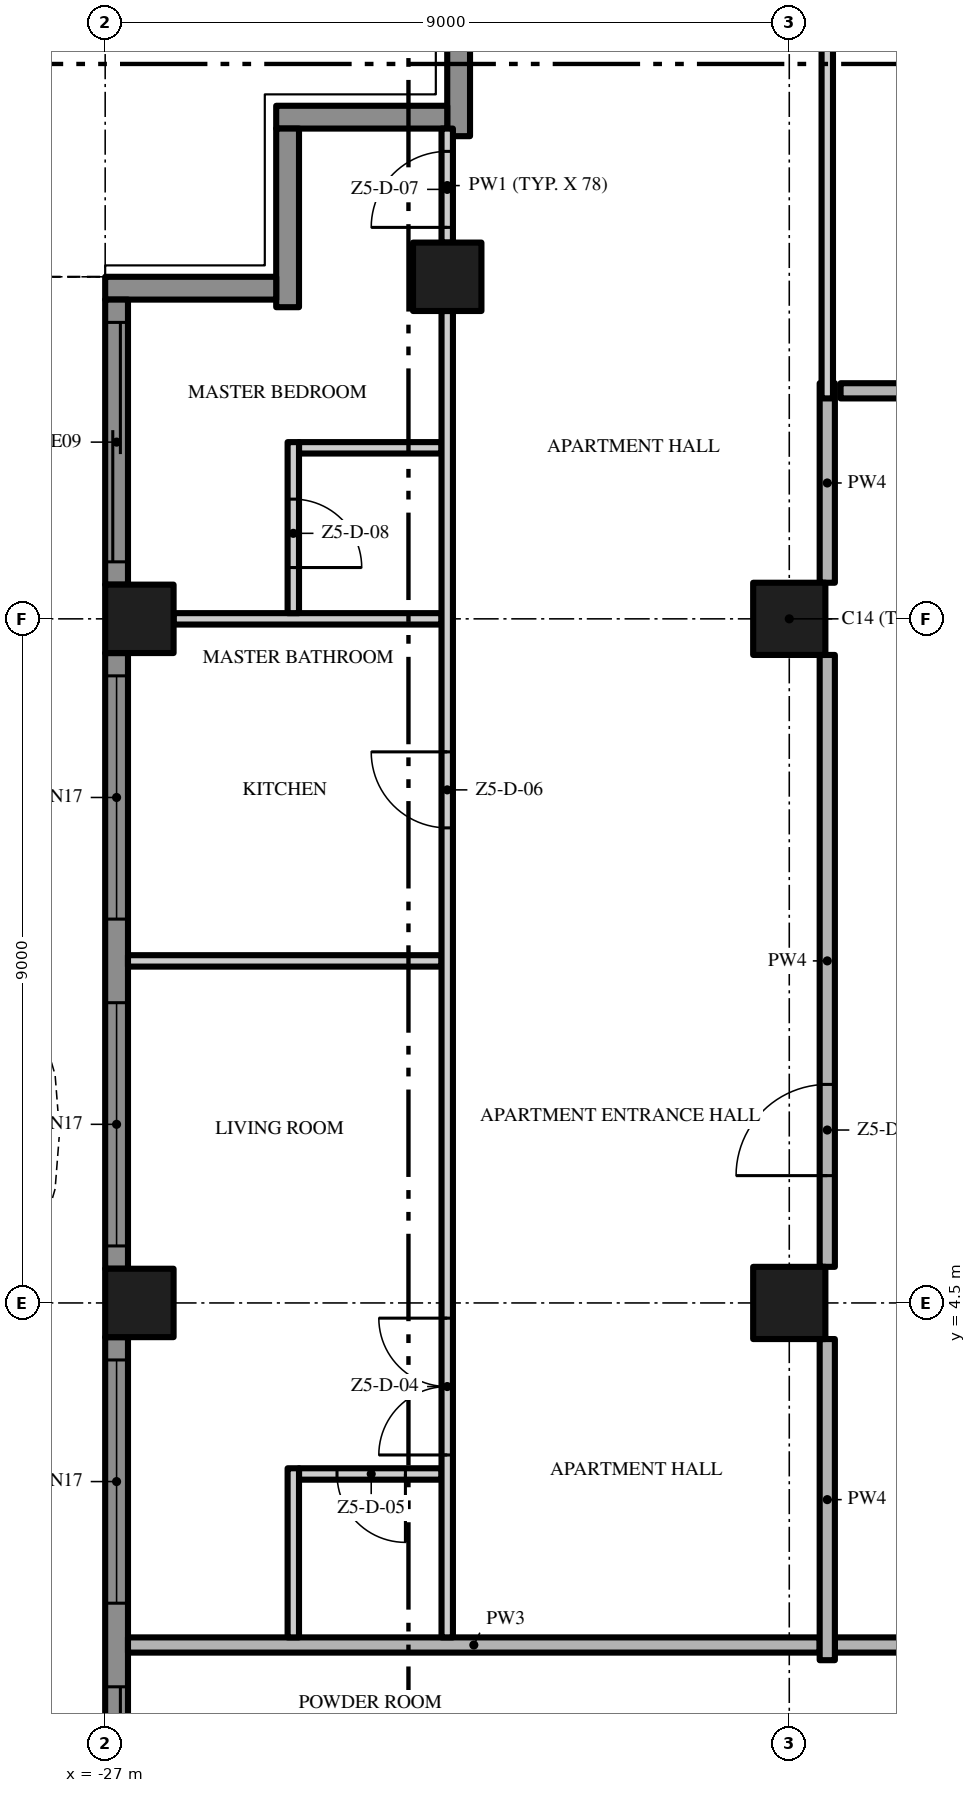
"""IFC4 building model, lengths in metres.
Left out: names, types, materials, properties, quantities, classifications, styles, units other than length and angle.
Written with IfcOpenShell. Run it as: python <this file> out.ifc"""

import sys

from ifc_helpers import new_model, si_unit, direction, frame, frame_2d, origin, origin_2d, place, context, subcontext, project, spatial, polyline, rectangle, outline, extrude, element, fill, save


model = new_model("IFC4")
c1 = context("Model", 3, precision=1e-05, world=origin(), true_north=direction((0.0, 1.0)))
c2 = subcontext(c1, "Body", "Model", "MODEL_VIEW")
j1 = project(units=[si_unit("LENGTHUNIT", "METRE"), si_unit("PLANEANGLEUNIT", "RADIAN")], contexts=[c1])
p1 = place(None, origin())
s1 = spatial("IfcSite", under=j1, at=p1, CompositionType="ELEMENT")
p2 = place(p1, origin())
s2 = spatial("IfcBuilding", under=s1, at=p2, CompositionType="ELEMENT")
p3 = place(p2, frame((0.0, 0.0, 273.0)))
s3 = spatial("IfcBuildingStorey", under=s2, at=p3, CompositionType="ELEMENT", Elevation=273.0)
for number, where, z_axis, x_axis in (
    (1, (-18.0, 13.5, 0.0), (0.0, 0.0, 1.0), (1.0, 0.0, 0.0)),
    (2, (-18.0, 4.5, 0.0), (0.0, 0.0, 1.0), (1.0, 0.0, 0.0)),
):
    element("IfcColumn", number, at=place(p3, frame(where, z_axis=z_axis, x_axis=x_axis)), inside=s3, PredefinedType="COLUMN", context=c2, shape_type="SweptSolid", body=[
        extrude(rectangle(XDim=0.95, YDim=0.95, at=origin_2d()), origin(), (0.0, 0.0, 1.0), 3.5),
    ])
for number, where, z_axis, x_axis in (
    (3, (-26.55, 13.5, 0.0), (0.0, 0.0, 1.0), (1.0, 0.0, 0.0)),
    (4, (-22.5, 18.0, 0.0), (0.0, 0.0, 1.0), (1.0, 0.0, 0.0)),
    (5, (-26.55, 4.5, 0.0), (0.0, 0.0, 1.0), (1.0, 0.0, 0.0)),
):
    element("IfcColumn", number, at=place(p3, frame(where, z_axis=z_axis, x_axis=x_axis)), inside=s3, PredefinedType="COLUMN", context=c2, shape_type="SweptSolid", body=[
        extrude(rectangle(XDim=0.9, YDim=0.9, at=origin_2d()), origin(), (0.0, 0.0, 1.0), 3.5),
    ])
p4 = place(p3, frame((-22.35, 19.85, 0.0), z_axis=(0.0, 0.0, 1.0), x_axis=(0.0, 1.0, 0.0)))
e6 = element("IfcWall", 6, at=p4, inside=s3, PredefinedType="SOLIDWALL", context=c2, shape_type="SweptSolid", body=[
    extrude(rectangle(XDim=2.35, YDim=0.3, at=frame_2d((1.175, 0.0))), origin(), (0.0, 0.0, 1.0), 3.5),
])
p5 = place(p3, frame((-24.75, 20.1, 0.0), z_axis=(0.0, 0.0, 1.0), x_axis=(1.0, 0.0, 0.0)))
e7 = element("IfcWall", 7, at=p5, inside=s3, PredefinedType="SOLIDWALL", context=c2, shape_type="SweptSolid", body=[
    extrude(rectangle(XDim=2.25, YDim=0.3, at=frame_2d((1.125, 0.0))), origin(), (0.0, 0.0, 1.0), 3.5),
])
p6 = place(p3, frame((-24.6, 17.6, 0.0), z_axis=(0.0, 0.0, 1.0), x_axis=(0.0, 1.0, 0.0)))
e8 = element("IfcWall", 8, at=p6, inside=s3, PredefinedType="SOLIDWALL", context=c2, shape_type="SweptSolid", body=[
    extrude(rectangle(XDim=2.35, YDim=0.3, at=frame_2d((1.175, 0.0))), origin(), (0.0, 0.0, 1.0), 3.5),
])
p7 = place(p3, frame((-27.0, 17.85, 0.0), z_axis=(0.0, 0.0, 1.0), x_axis=(1.0, 0.0, 0.0)))
e9 = element("IfcWall", 9, at=p7, inside=s3, PredefinedType="SOLIDWALL", context=c2, shape_type="SweptSolid", body=[
    extrude(rectangle(XDim=2.25, YDim=0.3, at=frame_2d((1.125, 0.0))), origin(), (0.0, 0.0, 1.0), 3.5),
])
p8 = place(p3, frame((-26.85, 13.95, 0.0), z_axis=(0.0, 0.0, 1.0), x_axis=(0.0, 1.0, 0.0)))
e10 = element("IfcWall", 10, at=p8, inside=s3, PredefinedType="SOLIDWALL", context=c2, shape_type="SweptSolid", body=[
    extrude(rectangle(XDim=3.75, YDim=0.3, at=frame_2d((1.875, 0.0))), origin(), (0.0, 0.0, 1.0), 3.5),
])
p9 = place(p8, frame((0.3, 0.0, 0.0)))
e11 = element("IfcOpeningElement", 11, at=p9, cuts=e10, PredefinedType="OPENING", context=c2, shape_type="SweptSolid", body=[
    extrude(rectangle(XDim=3.15, YDim=2.4, at=frame_2d((1.575, 1.2))), frame((0.0, 0.16, 0.0), z_axis=(0.0, -1.0, 0.0), x_axis=(1.0, 0.0, 0.0)), (0.0, 0.0, 1.0), 0.32),
])
p10 = place(p3, frame((-26.85, 4.95, 0.0), z_axis=(0.0, 0.0, 1.0), x_axis=(0.0, 1.0, 0.0)))
e12 = element("IfcWall", 12, at=p10, inside=s3, PredefinedType="SOLIDWALL", context=c2, shape_type="SweptSolid", body=[
    extrude(rectangle(XDim=8.1, YDim=0.3, at=frame_2d((4.05, 0.0))), origin(), (0.0, 0.0, 1.0), 3.5),
])
p11 = place(p10, frame((4.6, 0.0, 0.45)))
e13 = element("IfcOpeningElement", 13, at=p11, cuts=e12, PredefinedType="OPENING", context=c2, shape_type="SweptSolid", body=[
    extrude(rectangle(XDim=3.2, YDim=2.65, at=frame_2d((1.6, 1.325))), frame((0.0, 0.16, 0.0), z_axis=(0.0, -1.0, 0.0), x_axis=(1.0, 0.0, 0.0)), (0.0, 0.0, 1.0), 0.32),
])
p12 = place(p10, frame((0.3, 0.0, 0.45)))
e14 = element("IfcOpeningElement", 14, at=p12, cuts=e12, PredefinedType="OPENING", context=c2, shape_type="SweptSolid", body=[
    extrude(rectangle(XDim=3.2, YDim=2.65, at=frame_2d((1.6, 1.325))), frame((0.0, 0.16, 0.0), z_axis=(0.0, -1.0, 0.0), x_axis=(1.0, 0.0, 0.0)), (0.0, 0.0, 1.0), 0.32),
])
p13 = place(p3, frame((-26.85, -4.05, 0.0), z_axis=(0.0, 0.0, 1.0), x_axis=(0.0, 1.0, 0.0)))
e15 = element("IfcWall", 15, at=p13, inside=s3, PredefinedType="SOLIDWALL", context=c2, shape_type="SweptSolid", body=[
    extrude(rectangle(XDim=8.1, YDim=0.3, at=frame_2d((4.05, 0.0))), origin(), (0.0, 0.0, 1.0), 3.5),
])
p14 = place(p13, frame((4.6, 0.0, 0.45)))
e16 = element("IfcOpeningElement", 16, at=p14, cuts=e15, PredefinedType="OPENING", context=c2, shape_type="SweptSolid", body=[
    extrude(rectangle(XDim=3.2, YDim=2.65, at=frame_2d((1.6, 1.325))), frame((0.0, 0.16, 0.0), z_axis=(0.0, -1.0, 0.0), x_axis=(1.0, 0.0, 0.0)), (0.0, 0.0, 1.0), 0.32),
])
p15 = place(p13, frame((0.3, 0.0, 0.0)))
e17 = element("IfcOpeningElement", 17, at=p15, cuts=e15, PredefinedType="OPENING", context=c2, shape_type="SweptSolid", body=[
    extrude(rectangle(XDim=3.2, YDim=2.4, at=frame_2d((1.6, 1.2))), frame((0.0, 0.16, 0.0), z_axis=(0.0, -1.0, 0.0), x_axis=(1.0, 0.0, 0.0)), (0.0, 0.0, 1.0), 0.32),
])
p16 = place(p3, origin())
e18 = element("IfcWall", 18, at=p16, inside=s3, PredefinedType="USERDEFINED", context=c2, shape_type="SweptSolid", body=[
    extrude(outline(polyline([(-28.8, 18.0), (-29.505, 16.5), (-29.941, 15.0), (-30.0, 14.25), (-29.941, 13.5), (-29.505, 12.0), (-28.8, 10.5), (-28.095, 9.0), (-27.659, 7.5), (-27.6, 6.75), (-27.659, 6.0), (-28.095, 4.5), (-28.8, 3.0), (-29.505, 1.5), (-29.941, 0.0), (-30.0, -0.75), (-29.941, -1.5), (-29.505, -3.0), (-28.8, -4.5), (-28.095, -6.0), (-27.659, -7.5), (-27.6, -8.25), (-27.659, -9.0), (-28.095, -10.5), (-28.8, -12.0), (-29.505, -13.5), (-29.941, -15.0), (-30.0, -15.75), (-29.941, -16.5), (-29.505, -18.0), (-29.265, -17.93), (-29.694, -16.455), (-29.749, -15.75), (-29.694, -15.045), (-29.271, -13.589), (-28.574, -12.106), (-27.86, -10.589), (-27.411, -9.045), (-27.349, -8.25), (-27.411, -7.455), (-27.86, -5.911), (-28.574, -4.394), (-29.271, -2.911), (-29.694, -1.455), (-29.749, -0.75), (-29.694, -0.045), (-29.271, 1.411), (-28.574, 2.894), (-27.86, 4.411), (-27.411, 5.955), (-27.349, 6.75), (-27.411, 7.545), (-27.86, 9.089), (-28.574, 10.606), (-29.271, 12.089), (-29.694, 13.545), (-29.749, 14.25), (-29.694, 14.955), (-29.271, 16.411), (-28.574, 17.894), (-28.8, 18.0)])), origin(), (0.0, 0.0, 1.0), 0.9),
])
p17 = place(p3, frame((17.4, 0.0, 0.0), z_axis=(0.0, 0.0, 1.0), x_axis=(-1.0, 0.0, 0.0)))
e19 = element("IfcWall", 19, at=p17, inside=s3, PredefinedType="PARTITIONING", context=c2, shape_type="SweptSolid", body=[
    extrude(rectangle(XDim=34.8, YDim=0.2, at=frame_2d((17.4, 0.0))), origin(), (0.0, 0.0, 1.0), 3.5),
])
p18 = place(p17, frame((25.65, 0.0, 0.0)))
e20 = element("IfcOpeningElement", 20, at=p18, cuts=e19, PredefinedType="OPENING", context=c2, shape_type="SweptSolid", body=[
    extrude(rectangle(XDim=1.5, YDim=2.4, at=frame_2d((0.75, 1.2))), frame((0.0, 0.11, 0.0), z_axis=(0.0, -1.0, 0.0), x_axis=(1.0, 0.0, 0.0)), (0.0, 0.0, 1.0), 0.22),
])
p19 = place(p17, frame((7.65, 0.0, 0.0)))
e21 = element("IfcOpeningElement", 21, at=p19, cuts=e19, PredefinedType="OPENING", context=c2, shape_type="SweptSolid", body=[
    extrude(rectangle(XDim=1.5, YDim=2.4, at=frame_2d((0.75, 1.2))), frame((0.0, 0.11, 0.0), z_axis=(0.0, -1.0, 0.0), x_axis=(1.0, 0.0, 0.0)), (0.0, 0.0, 1.0), 0.22),
])
p20 = place(p3, frame((-26.7, 0.0, 0.0), z_axis=(0.0, 0.0, 1.0), x_axis=(1.0, 0.0, 0.0)))
e22 = element("IfcWall", 22, at=p20, inside=s3, PredefinedType="PARTITIONING", context=c2, shape_type="SweptSolid", body=[
    extrude(rectangle(XDim=9.1, YDim=0.2, at=frame_2d((4.55, 0.0))), origin(), (0.0, 0.0, 1.0), 3.5),
])
p21 = place(p3, frame((-22.575, 2.25, 0.0), z_axis=(0.0, 0.0, 1.0), x_axis=(-1.0, 0.0, 0.0)))
e23 = element("IfcWall", 23, at=p21, inside=s3, PredefinedType="PARTITIONING", context=c2, shape_type="SweptSolid", body=[
    extrude(rectangle(XDim=1.875, YDim=0.15, at=frame_2d((0.938, 0.0))), origin(), (0.0, 0.0, 1.0), 3.5),
])
p22 = place(p21, frame((0.475, 0.0, 0.0)))
e24 = element("IfcOpeningElement", 24, at=p22, cuts=e23, PredefinedType="OPENING", context=c2, shape_type="SweptSolid", body=[
    extrude(rectangle(XDim=0.9, YDim=2.1, at=frame_2d((0.45, 1.05))), frame((0.0, 0.085, 0.0), z_axis=(0.0, -1.0, 0.0), x_axis=(1.0, 0.0, 0.0)), (0.0, 0.0, 1.0), 0.17),
])
p23 = place(p3, frame((-26.7, 9.0, 0.0), z_axis=(0.0, 0.0, 1.0), x_axis=(1.0, 0.0, 0.0)))
e25 = element("IfcWall", 25, at=p23, inside=s3, PredefinedType="PARTITIONING", context=c2, shape_type="SweptSolid", body=[
    extrude(rectangle(XDim=4.125, YDim=0.15, at=frame_2d((2.062, 0.0))), origin(), (0.0, 0.0, 1.0), 3.5),
])
p24 = place(p3, frame((-26.1, 13.5, 0.0), z_axis=(0.0, 0.0, 1.0), x_axis=(1.0, 0.0, 0.0)))
e26 = element("IfcWall", 26, at=p24, inside=s3, PredefinedType="PARTITIONING", context=c2, shape_type="SweptSolid", body=[
    extrude(rectangle(XDim=3.525, YDim=0.15, at=frame_2d((1.762, 0.0))), origin(), (0.0, 0.0, 1.0), 3.5),
])
p25 = place(p3, frame((-24.45, 15.75, 0.0), z_axis=(0.0, 0.0, 1.0), x_axis=(1.0, 0.0, 0.0)))
e27 = element("IfcWall", 27, at=p25, inside=s3, PredefinedType="PARTITIONING", context=c2, shape_type="SweptSolid", body=[
    extrude(rectangle(XDim=1.875, YDim=0.15, at=frame_2d((0.938, 0.0))), origin(), (0.0, 0.0, 1.0), 3.5),
])
p26 = place(p3, frame((-17.325, 16.5, 0.0), z_axis=(0.0, 0.0, 1.0), x_axis=(1.0, 0.0, 0.0)))
e28 = element("IfcWall", 28, at=p26, inside=s3, PredefinedType="PARTITIONING", context=c2, shape_type="SweptSolid", body=[
    extrude(rectangle(XDim=3.825, YDim=0.2, at=frame_2d((1.913, 0.0))), origin(), (0.0, 0.0, 1.0), 3.5),
])
p27 = place(p26, frame((1.35, 0.0, 0.0)))
e29 = element("IfcOpeningElement", 29, at=p27, cuts=e28, PredefinedType="OPENING", context=c2, shape_type="SweptSolid", body=[
    extrude(rectangle(XDim=0.9, YDim=2.1, at=frame_2d((0.45, 1.05))), frame((0.0, 0.11, 0.0), z_axis=(0.0, -1.0, 0.0), x_axis=(1.0, 0.0, 0.0)), (0.0, 0.0, 1.0), 0.22),
])
p28 = place(p3, frame((-24.525, 0.1, 0.0), z_axis=(0.0, 0.0, 1.0), x_axis=(0.0, 1.0, 0.0)))
e30 = element("IfcWall", 30, at=p28, inside=s3, PredefinedType="PARTITIONING", context=c2, shape_type="SweptSolid", body=[
    extrude(rectangle(XDim=2.225, YDim=0.15, at=frame_2d((1.113, 0.0))), origin(), (0.0, 0.0, 1.0), 3.5),
])
p29 = place(p3, frame((-24.525, 15.825, 0.0), z_axis=(0.0, 0.0, 1.0), x_axis=(0.0, -1.0, 0.0)))
e31 = element("IfcWall", 31, at=p29, inside=s3, PredefinedType="PARTITIONING", context=c2, shape_type="SweptSolid", body=[
    extrude(rectangle(XDim=2.25, YDim=0.15, at=frame_2d((1.125, 0.0))), origin(), (0.0, 0.0, 1.0), 3.5),
])
p30 = place(p29, frame((0.75, 0.0, 0.0)))
e32 = element("IfcOpeningElement", 32, at=p30, cuts=e31, PredefinedType="OPENING", context=c2, shape_type="SweptSolid", body=[
    extrude(rectangle(XDim=0.9, YDim=2.1, at=frame_2d((0.45, 1.05))), frame((0.0, 0.085, 0.0), z_axis=(0.0, -1.0, 0.0), x_axis=(1.0, 0.0, 0.0)), (0.0, 0.0, 1.0), 0.17),
])
p31 = place(p3, frame((-22.5, 0.1, 0.0), z_axis=(0.0, 0.0, 1.0), x_axis=(0.0, 1.0, 0.0)))
e33 = element("IfcWall", 33, at=p31, inside=s3, PredefinedType="PARTITIONING", context=c2, shape_type="SweptSolid", body=[
    extrude(rectangle(XDim=17.45, YDim=0.15, at=frame_2d((8.725, 0.0))), origin(), (0.0, 0.0, 1.0), 3.5),
])
p32 = place(p31, frame((2.4, 0.0, 0.0)))
e34 = element("IfcOpeningElement", 34, at=p32, cuts=e33, PredefinedType="OPENING", context=c2, shape_type="SweptSolid", body=[
    extrude(rectangle(XDim=1.8, YDim=2.4, at=frame_2d((0.9, 1.2))), frame((0.0, 0.085, 0.0), z_axis=(0.0, -1.0, 0.0), x_axis=(1.0, 0.0, 0.0)), (0.0, 0.0, 1.0), 0.17),
])
p33 = place(p31, frame((10.65, 0.0, 0.0)))
e35 = element("IfcOpeningElement", 35, at=p33, cuts=e33, PredefinedType="OPENING", context=c2, shape_type="SweptSolid", body=[
    extrude(rectangle(XDim=1.0, YDim=2.4, at=frame_2d((0.5, 1.2))), frame((0.0, 0.085, 0.0), z_axis=(0.0, -1.0, 0.0), x_axis=(1.0, 0.0, 0.0)), (0.0, 0.0, 1.0), 0.17),
])
p34 = place(p3, frame((-22.5, 18.45, 0.0), z_axis=(0.0, 0.0, 1.0), x_axis=(0.0, 1.0, 0.0)))
e36 = element("IfcWall", 36, at=p34, inside=s3, PredefinedType="PARTITIONING", context=c2, shape_type="SweptSolid", body=[
    extrude(rectangle(XDim=1.5, YDim=0.15, at=frame_2d((0.75, 0.0))), origin(), (0.0, 0.0, 1.0), 3.5),
])
p35 = place(p34, frame((0.2, 0.0, 0.0)))
e37 = element("IfcOpeningElement", 37, at=p35, cuts=e36, PredefinedType="OPENING", context=c2, shape_type="SweptSolid", body=[
    extrude(rectangle(XDim=1.0, YDim=2.4, at=frame_2d((0.5, 1.2))), frame((0.0, 0.085, 0.0), z_axis=(0.0, -1.0, 0.0), x_axis=(1.0, 0.0, 0.0)), (0.0, 0.0, 1.0), 0.17),
])
p36 = place(p3, frame((-17.5, -0.2, 0.0), z_axis=(0.0, 0.0, 1.0), x_axis=(0.0, 1.0, 0.0)))
e38 = element("IfcWall", 38, at=p36, inside=s3, PredefinedType="PARTITIONING", context=c2, shape_type="SweptSolid", body=[
    extrude(rectangle(XDim=4.225, YDim=0.2, at=frame_2d((2.112, 0.0))), origin(), (0.0, 0.0, 1.0), 3.5),
])
p37 = place(p3, frame((-17.5, 4.975, 0.0), z_axis=(0.0, 0.0, 1.0), x_axis=(0.0, 1.0, 0.0)))
e39 = element("IfcWall", 39, at=p37, inside=s3, PredefinedType="PARTITIONING", context=c2, shape_type="SweptSolid", body=[
    extrude(rectangle(XDim=8.05, YDim=0.2, at=frame_2d((4.025, 0.0))), origin(), (0.0, 0.0, 1.0), 3.5),
])
p38 = place(p37, frame((1.2, 0.0, 0.0)))
e40 = element("IfcOpeningElement", 40, at=p38, cuts=e39, PredefinedType="OPENING", context=c2, shape_type="SweptSolid", body=[
    extrude(rectangle(XDim=1.2, YDim=2.4, at=frame_2d((0.6, 1.2))), frame((0.0, 0.11, 0.0), z_axis=(0.0, -1.0, 0.0), x_axis=(1.0, 0.0, 0.0)), (0.0, 0.0, 1.0), 0.22),
])
p39 = place(p3, frame((-17.5, 13.975, 0.0), z_axis=(0.0, 0.0, 1.0), x_axis=(0.0, 1.0, 0.0)))
e41 = element("IfcWall", 41, at=p39, inside=s3, PredefinedType="PARTITIONING", context=c2, shape_type="SweptSolid", body=[
    extrude(rectangle(XDim=2.625, YDim=0.2, at=frame_2d((1.312, 0.0))), origin(), (0.0, 0.0, 1.0), 3.5),
])
p40 = place(p3, frame((-17.5, 16.4, 0.0), z_axis=(0.0, 0.0, 1.0), x_axis=(0.0, 1.0, 0.0)))
e42 = element("IfcWall", 42, at=p40, inside=s3, PredefinedType="PARTITIONING", context=c2, shape_type="SweptSolid", body=[
    extrude(rectangle(XDim=5.2, YDim=0.15, at=frame_2d((2.6, 0.0))), origin(), (0.0, 0.0, 1.0), 3.5),
])
p41 = place(p9, origin())
e43 = element("IfcDoor", 43, at=p41, inside=s3, OperationType="SINGLE_SWING_LEFT", PredefinedType="DOOR", context=c2, shape_type="SweptSolid", body=[
    extrude(rectangle(XDim=3.15, YDim=2.4, at=frame_2d((1.575, 1.2))), frame((0.0, 0.025, 0.0), z_axis=(0.0, -1.0, 0.0), x_axis=(1.0, 0.0, 0.0)), (0.0, 0.0, 1.0), 0.05),
])
fill(e11, e43)
p42 = place(p11, origin())
e44 = element("IfcWindow", 44, at=p42, inside=s3, PartitioningType="SINGLE_PANEL", PredefinedType="WINDOW", context=c2, shape_type="SweptSolid", body=[
    extrude(rectangle(XDim=3.2, YDim=2.65, at=frame_2d((1.6, 1.325))), frame((0.0, 0.03, 0.0), z_axis=(0.0, -1.0, 0.0), x_axis=(1.0, 0.0, 0.0)), (0.0, 0.0, 1.0), 0.06),
])
fill(e13, e44)
p43 = place(p12, origin())
e45 = element("IfcWindow", 45, at=p43, inside=s3, PartitioningType="SINGLE_PANEL", PredefinedType="WINDOW", context=c2, shape_type="SweptSolid", body=[
    extrude(rectangle(XDim=3.2, YDim=2.65, at=frame_2d((1.6, 1.325))), frame((0.0, 0.03, 0.0), z_axis=(0.0, -1.0, 0.0), x_axis=(1.0, 0.0, 0.0)), (0.0, 0.0, 1.0), 0.06),
])
fill(e14, e45)
p44 = place(p14, origin())
e46 = element("IfcWindow", 46, at=p44, inside=s3, PartitioningType="SINGLE_PANEL", PredefinedType="WINDOW", context=c2, shape_type="SweptSolid", body=[
    extrude(rectangle(XDim=3.2, YDim=2.65, at=frame_2d((1.6, 1.325))), frame((0.0, 0.03, 0.0), z_axis=(0.0, -1.0, 0.0), x_axis=(1.0, 0.0, 0.0)), (0.0, 0.0, 1.0), 0.06),
])
fill(e16, e46)
p45 = place(p15, origin())
e47 = element("IfcDoor", 47, at=p45, inside=s3, OperationType="SINGLE_SWING_LEFT", PredefinedType="DOOR", context=c2, shape_type="SweptSolid", body=[
    extrude(rectangle(XDim=3.2, YDim=2.4, at=frame_2d((1.6, 1.2))), frame((0.0, 0.025, 0.0), z_axis=(0.0, -1.0, 0.0), x_axis=(1.0, 0.0, 0.0)), (0.0, 0.0, 1.0), 0.05),
])
fill(e17, e47)
p46 = place(p38, origin())
e48 = element("IfcDoor", 48, at=p46, inside=s3, OperationType="SINGLE_SWING_LEFT", PredefinedType="DOOR", context=c2, shape_type="SweptSolid", body=[
    extrude(rectangle(XDim=1.2, YDim=2.4, at=frame_2d((0.6, 1.2))), frame((0.0, 0.025, 0.0), z_axis=(0.0, -1.0, 0.0), x_axis=(1.0, 0.0, 0.0)), (0.0, 0.0, 1.0), 0.05),
])
fill(e40, e48)
p47 = place(p32, origin())
e49 = element("IfcDoor", 49, at=p47, inside=s3, OperationType="DOUBLE_DOOR_SINGLE_SWING", PredefinedType="DOOR", context=c2, shape_type="SweptSolid", body=[
    extrude(rectangle(XDim=1.8, YDim=2.4, at=frame_2d((0.9, 1.2))), frame((0.0, 0.025, 0.0), z_axis=(0.0, -1.0, 0.0), x_axis=(1.0, 0.0, 0.0)), (0.0, 0.0, 1.0), 0.05),
])
fill(e34, e49)
p48 = place(p22, origin())
e50 = element("IfcDoor", 50, at=p48, inside=s3, OperationType="SINGLE_SWING_LEFT", PredefinedType="DOOR", context=c2, shape_type="SweptSolid", body=[
    extrude(rectangle(XDim=0.9, YDim=2.1, at=frame_2d((0.45, 1.05))), frame((0.0, 0.025, 0.0), z_axis=(0.0, -1.0, 0.0), x_axis=(1.0, 0.0, 0.0)), (0.0, 0.0, 1.0), 0.05),
])
fill(e24, e50)
p49 = place(p33, origin())
e51 = element("IfcDoor", 51, at=p49, inside=s3, OperationType="SINGLE_SWING_RIGHT", PredefinedType="DOOR", context=c2, shape_type="SweptSolid", body=[
    extrude(rectangle(XDim=1.0, YDim=2.4, at=frame_2d((0.5, 1.2))), frame((0.0, 0.025, 0.0), z_axis=(0.0, -1.0, 0.0), x_axis=(1.0, 0.0, 0.0)), (0.0, 0.0, 1.0), 0.05),
])
fill(e35, e51)
p50 = place(p35, origin())
e52 = element("IfcDoor", 52, at=p50, inside=s3, OperationType="SINGLE_SWING_LEFT", PredefinedType="DOOR", context=c2, shape_type="SweptSolid", body=[
    extrude(rectangle(XDim=1.0, YDim=2.4, at=frame_2d((0.5, 1.2))), frame((0.0, 0.025, 0.0), z_axis=(0.0, -1.0, 0.0), x_axis=(1.0, 0.0, 0.0)), (0.0, 0.0, 1.0), 0.05),
])
fill(e37, e52)
p51 = place(p30, origin())
e53 = element("IfcDoor", 53, at=p51, inside=s3, OperationType="SINGLE_SWING_RIGHT", PredefinedType="DOOR", context=c2, shape_type="SweptSolid", body=[
    extrude(rectangle(XDim=0.9, YDim=2.1, at=frame_2d((0.45, 1.05))), frame((0.0, 0.025, 0.0), z_axis=(0.0, -1.0, 0.0), x_axis=(1.0, 0.0, 0.0)), (0.0, 0.0, 1.0), 0.05),
])
fill(e32, e53)
save(model, sys.argv[1])
